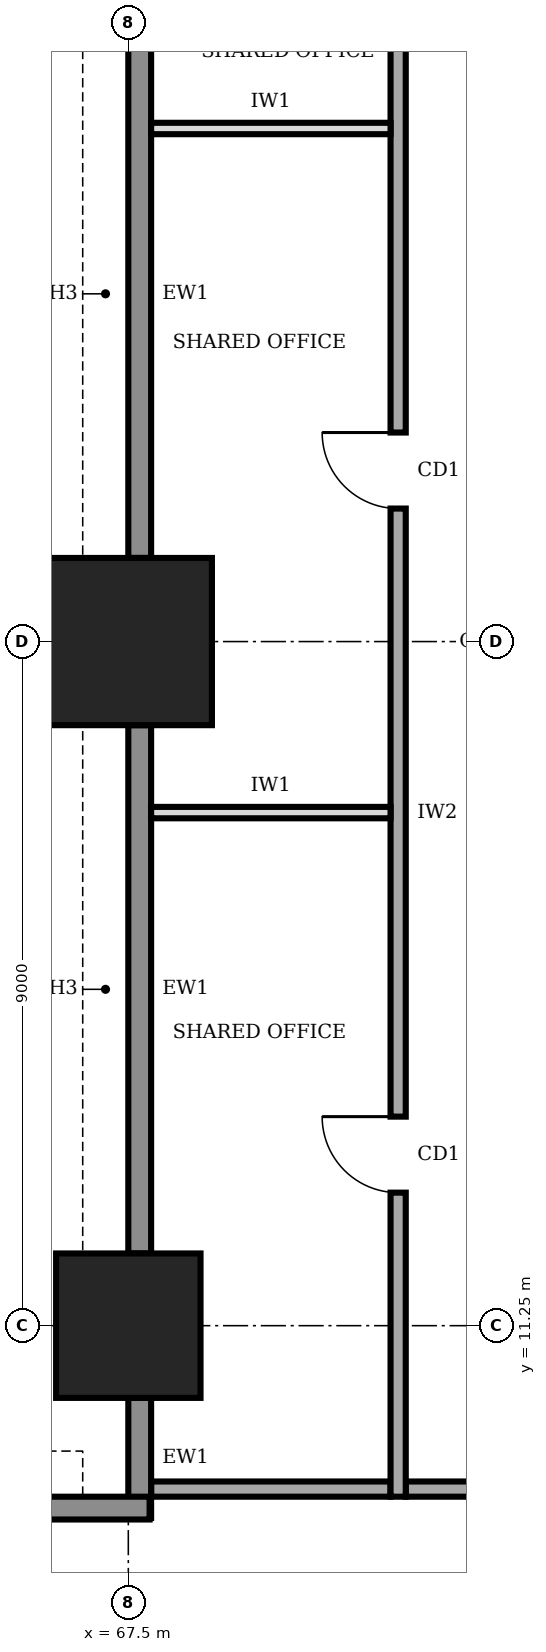
"""IFC4 building model, lengths in metres.
Left out: names, types, materials, properties, quantities, classifications, styles, units other than length and angle.
Written with IfcOpenShell. Run it as: python <this file> out.ifc"""

import sys

from ifc_helpers import new_model, si_unit, direction, frame, frame_2d, origin, origin_2d, place, context, subcontext, project, spatial, rectangle, extrude, element, fill, save


model = new_model("IFC4")
c1 = context("Model", 3, precision=1e-05, world=origin(), true_north=direction((0.0, 1.0)))
c2 = subcontext(c1, "Body", "Model", "MODEL_VIEW")
j1 = project(units=[si_unit("LENGTHUNIT", "METRE"), si_unit("PLANEANGLEUNIT", "RADIAN")], contexts=[c1])
p1 = place(None, origin())
s1 = spatial("IfcSite", under=j1, at=p1, CompositionType="ELEMENT")
p2 = place(p1, origin())
s2 = spatial("IfcBuilding", under=s1, at=p2, CompositionType="ELEMENT")
p3 = place(p2, frame((0.0, 0.0, 137.0)))
s3 = spatial("IfcBuildingStorey", under=s2, at=p3, CompositionType="ELEMENT", Elevation=137.0)
p4 = place(p3, frame((67.5, 11.25, 0.0), z_axis=(0.0, 0.0, 1.0), x_axis=(1.0, 0.0, 0.0)))
e1 = element("IfcColumn", 1, at=p4, inside=s3, PredefinedType="COLUMN", context=c2, shape_type="SweptSolid", body=[
    extrude(rectangle(XDim=1.9, YDim=1.9, at=origin_2d()), origin(), (0.0, 0.0, 1.0), 4.0),
])
p5 = place(p3, frame((67.5, 20.25, 0.0), z_axis=(0.0, 0.0, 1.0), x_axis=(1.0, 0.0, 0.0)))
e2 = element("IfcColumn", 2, at=p5, inside=s3, PredefinedType="COLUMN", context=c2, shape_type="SweptSolid", body=[
    extrude(rectangle(XDim=2.2, YDim=2.2, at=origin_2d()), origin(), (0.0, 0.0, 1.0), 4.0),
])
for number, where, z_axis, x_axis in (
    (3, (67.65, 28.3, 0.0), (0.0, 0.0, 1.0), (0.0, -1.0, 0.0)),
    (4, (67.65, 19.15, 0.0), (0.0, 0.0, 1.0), (0.0, -1.0, 0.0)),
):
    element("IfcWall", number, at=place(p3, frame(where, z_axis=z_axis, x_axis=x_axis)), inside=s3, PredefinedType="STANDARD", context=c2, shape_type="SweptSolid", body=[
        extrude(rectangle(XDim=6.95, YDim=0.3, at=frame_2d((3.475, 0.0))), origin(), (0.0, 0.0, 1.0), 2.65),
    ])
p6 = place(p3, frame((67.65, 10.3, 0.0), z_axis=(0.0, 0.0, 1.0), x_axis=(0.0, -1.0, 0.0)))
e5 = element("IfcWall", 5, at=p6, inside=s3, PredefinedType="STANDARD", context=c2, shape_type="SweptSolid", body=[
    extrude(rectangle(XDim=1.58, YDim=0.3, at=frame_2d((0.79, 0.0))), origin(), (0.0, 0.0, 1.0), 2.65),
])
p7 = place(p3, frame((67.78, 8.85, 0.0), z_axis=(0.0, 0.0, 1.0), x_axis=(-1.0, 0.0, 0.0)))
e6 = element("IfcWall", 6, at=p7, inside=s3, PredefinedType="STANDARD", context=c2, shape_type="SweptSolid", body=[
    extrude(rectangle(XDim=4.76, YDim=0.3, at=frame_2d((2.38, 0.0))), origin(), (0.0, 0.0, 1.0), 3.75),
])
p8 = place(p3, frame((71.15, 9.1, 0.0), z_axis=(0.0, 0.0, 1.0), x_axis=(1.0, 0.0, 0.0)))
e7 = element("IfcWall", 7, at=p8, inside=s3, PredefinedType="SOLIDWALL", context=c2, shape_type="SweptSolid", body=[
    extrude(rectangle(XDim=18.4, YDim=0.2, at=frame_2d((9.2, 0.0))), origin(), (0.0, 0.0, 1.0), 3.75),
])
p9 = place(p8, frame((4.325, 0.0, 0.0)))
e8 = element("IfcOpeningElement", 8, at=p9, cuts=e7, PredefinedType="OPENING", context=c2, shape_type="SweptSolid", body=[
    extrude(rectangle(XDim=1.0, YDim=2.1, at=frame_2d((0.5, 1.05))), frame((0.0, 0.11, 0.0), z_axis=(0.0, -1.0, 0.0), x_axis=(1.0, 0.0, 0.0)), (0.0, 0.0, 1.0), 0.22),
])
p10 = place(p8, frame((11.6, 0.0, 0.0)))
e9 = element("IfcOpeningElement", 9, at=p10, cuts=e7, PredefinedType="OPENING", context=c2, shape_type="SweptSolid", body=[
    extrude(rectangle(XDim=1.0, YDim=2.1, at=frame_2d((0.5, 1.05))), frame((0.0, 0.11, 0.0), z_axis=(0.0, -1.0, 0.0), x_axis=(1.0, 0.0, 0.0)), (0.0, 0.0, 1.0), 0.22),
])
p11 = place(p8, frame((15.875, 0.0, 0.0)))
e10 = element("IfcOpeningElement", 10, at=p11, cuts=e7, PredefinedType="OPENING", context=c2, shape_type="SweptSolid", body=[
    extrude(rectangle(XDim=1.0, YDim=2.1, at=frame_2d((0.5, 1.05))), frame((0.0, 0.11, 0.0), z_axis=(0.0, -1.0, 0.0), x_axis=(1.0, 0.0, 0.0)), (0.0, 0.0, 1.0), 0.22),
])
p12 = place(p3, frame((71.05, 32.8, 0.0), z_axis=(0.0, 0.0, 1.0), x_axis=(0.0, -1.0, 0.0)))
e11 = element("IfcWall", 11, at=p12, inside=s3, PredefinedType="SOLIDWALL", context=c2, shape_type="SweptSolid", body=[
    extrude(rectangle(XDim=23.8, YDim=0.2, at=frame_2d((11.9, 0.0))), origin(), (0.0, 0.0, 1.0), 3.75),
])
p13 = place(p12, frame((18.8, 0.0, 0.0)))
e12 = element("IfcOpeningElement", 12, at=p13, cuts=e11, PredefinedType="OPENING", context=c2, shape_type="SweptSolid", body=[
    extrude(rectangle(XDim=1.0, YDim=2.1, at=frame_2d((0.5, 1.05))), frame((0.0, 0.11, 0.0), z_axis=(0.0, -1.0, 0.0), x_axis=(1.0, 0.0, 0.0)), (0.0, 0.0, 1.0), 0.22),
])
p14 = place(p12, frame((9.8, 0.0, 0.0)))
e13 = element("IfcOpeningElement", 13, at=p14, cuts=e11, PredefinedType="OPENING", context=c2, shape_type="SweptSolid", body=[
    extrude(rectangle(XDim=1.0, YDim=2.1, at=frame_2d((0.5, 1.05))), frame((0.0, 0.11, 0.0), z_axis=(0.0, -1.0, 0.0), x_axis=(1.0, 0.0, 0.0)), (0.0, 0.0, 1.0), 0.22),
])
p15 = place(p12, frame((2.3, 0.0, 0.0)))
e14 = element("IfcOpeningElement", 14, at=p15, cuts=e11, PredefinedType="OPENING", context=c2, shape_type="SweptSolid", body=[
    extrude(rectangle(XDim=1.0, YDim=2.1, at=frame_2d((0.5, 1.05))), frame((0.0, 0.11, 0.0), z_axis=(0.0, -1.0, 0.0), x_axis=(1.0, 0.0, 0.0)), (0.0, 0.0, 1.0), 0.22),
])
p16 = place(p3, frame((67.8, 9.1, 0.0), z_axis=(0.0, 0.0, 1.0), x_axis=(1.0, 0.0, 0.0)))
e15 = element("IfcWall", 15, at=p16, inside=s3, PredefinedType="SOLIDWALL", context=c2, shape_type="SweptSolid", body=[
    extrude(rectangle(XDim=3.15, YDim=0.2, at=frame_2d((1.575, 0.0))), origin(), (0.0, 0.0, 1.0), 3.75),
])
for number, where, z_axis, x_axis in (
    (16, (67.8, 18.0, 0.0), (0.0, 0.0, 1.0), (1.0, 0.0, 0.0)),
    (17, (67.8, 27.0, 0.0), (0.0, 0.0, 1.0), (1.0, 0.0, 0.0)),
):
    element("IfcWall", number, at=place(p3, frame(where, z_axis=z_axis, x_axis=x_axis)), inside=s3, PredefinedType="PARTITIONING", context=c2, shape_type="SweptSolid", body=[
        extrude(rectangle(XDim=3.15, YDim=0.15, at=frame_2d((1.575, 0.0))), origin(), (0.0, 0.0, 1.0), 3.75),
    ])
p17 = place(p13, frame((1.0, 0.0, 0.0), z_axis=(0.0, 0.0, 1.0), x_axis=(-1.0, 0.0, 0.0)))
e18 = element("IfcDoor", 18, at=p17, inside=s3, OperationType="SINGLE_SWING_RIGHT", PredefinedType="DOOR", context=c2, shape_type="SweptSolid", body=[
    extrude(rectangle(XDim=1.0, YDim=2.1, at=frame_2d((0.5, 1.05))), frame((0.0, 0.025, 0.0), z_axis=(0.0, -1.0, 0.0), x_axis=(1.0, 0.0, 0.0)), (0.0, 0.0, 1.0), 0.05),
])
fill(e12, e18)
p18 = place(p14, frame((1.0, 0.0, 0.0), z_axis=(0.0, 0.0, 1.0), x_axis=(-1.0, 0.0, 0.0)))
e19 = element("IfcDoor", 19, at=p18, inside=s3, OperationType="SINGLE_SWING_RIGHT", PredefinedType="DOOR", context=c2, shape_type="SweptSolid", body=[
    extrude(rectangle(XDim=1.0, YDim=2.1, at=frame_2d((0.5, 1.05))), frame((0.0, 0.025, 0.0), z_axis=(0.0, -1.0, 0.0), x_axis=(1.0, 0.0, 0.0)), (0.0, 0.0, 1.0), 0.05),
])
fill(e13, e19)
save(model, sys.argv[1])
